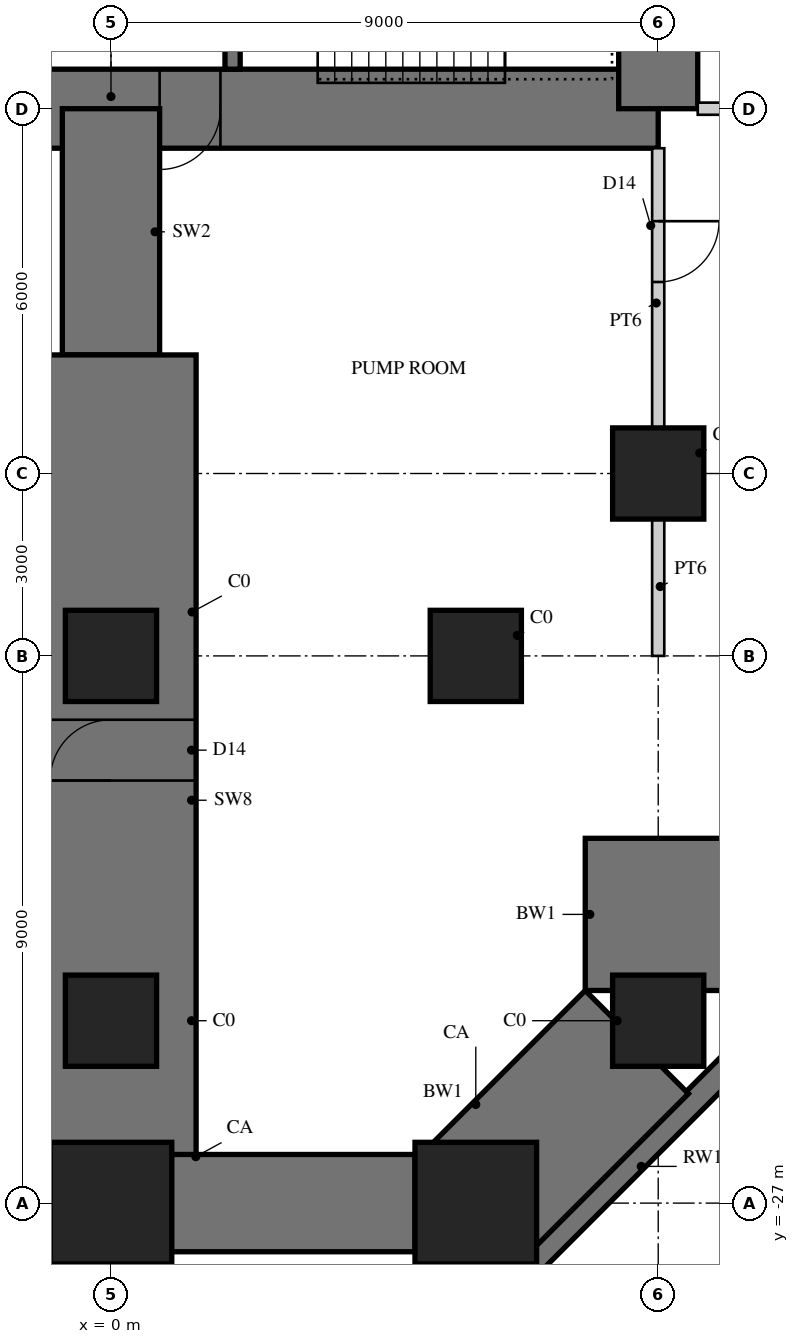
"""IFC4 building model, lengths in metres.
Left out: names, types, materials, properties, quantities, classifications, styles, units other than length and angle.
Written with IfcOpenShell. Run it as: python <this file> out.ifc"""

import sys

from ifc_helpers import new_model, si_unit, direction, frame, frame_2d, origin, origin_2d, place, context, subcontext, project, spatial, polyline, rectangle, outline, extrude, element, fill, save


model = new_model("IFC4")
c1 = context("Model", 3, precision=1e-05, world=origin(), true_north=direction((0.0, 1.0)))
c2 = subcontext(c1, "Body", "Model", "MODEL_VIEW")
j1 = project(units=[si_unit("LENGTHUNIT", "METRE"), si_unit("PLANEANGLEUNIT", "RADIAN")], contexts=[c1])
p1 = place(None, origin())
s1 = spatial("IfcSite", under=j1, at=p1, CompositionType="ELEMENT")
p2 = place(p1, origin())
s2 = spatial("IfcBuilding", under=s1, at=p2, CompositionType="ELEMENT")
p3 = place(p2, frame((0.0, 0.0, -8.0)))
s3 = spatial("IfcBuildingStorey", under=s2, at=p3, CompositionType="ELEMENT", Elevation=-8.0)
p4 = place(p3, origin())
e1 = element("IfcWall", 1, at=p4, inside=s3, PredefinedType="SOLIDWALL", context=c2, shape_type="SweptSolid", body=[
    extrude(outline(polyline([(10.15, -24.476), (10.55, -24.642), (6.642, -28.55), (6.476, -28.15), (10.15, -24.476)])), origin(), (0.0, 0.0, 1.0), 4.0),
])
p5 = place(p3, frame((-9.0, -9.0, 0.0), z_axis=(0.0, 0.0, 1.0), x_axis=(1.0, 0.0, 0.0)))
e2 = element("IfcWall", 2, at=p5, inside=s3, PredefinedType="SHEAR", context=c2, shape_type="SweptSolid", body=[
    extrude(rectangle(XDim=18.0, YDim=1.3, at=frame_2d((9.0, 0.0))), origin(), (0.0, 0.0, 1.0), 4.0),
])
p6 = place(p5, frame((9.8, 0.0, 0.0)))
e3 = element("IfcOpeningElement", 3, at=p6, cuts=e2, PredefinedType="OPENING", context=c2, shape_type="SweptSolid", body=[
    extrude(rectangle(XDim=1.0, YDim=2.4, at=frame_2d((0.5, 1.2))), frame((0.0, 0.66, 0.0), z_axis=(0.0, -1.0, 0.0), x_axis=(1.0, 0.0, 0.0)), (0.0, 0.0, 1.0), 1.32),
])
p7 = place(p3, frame((9.0, -9.0, 0.0), z_axis=(0.0, 0.0, 1.0), x_axis=(0.0, 1.0, 0.0)))
e4 = element("IfcWall", 4, at=p7, inside=s3, PredefinedType="SHEAR", context=c2, shape_type="SweptSolid", body=[
    extrude(rectangle(XDim=18.0, YDim=1.3, at=frame_2d((9.0, 0.0))), origin(), (0.0, 0.0, 1.0), 4.0),
])
p8 = place(p7, frame((9.8, 0.0, 0.0)))
e5 = element("IfcOpeningElement", 5, at=p8, cuts=e4, PredefinedType="OPENING", context=c2, shape_type="SweptSolid", body=[
    extrude(rectangle(XDim=1.0, YDim=2.4, at=frame_2d((0.5, 1.2))), frame((0.0, 0.66, 0.0), z_axis=(0.0, -1.0, 0.0), x_axis=(1.0, 0.0, 0.0)), (0.0, 0.0, 1.0), 1.32),
])
p9 = place(p3, frame((2.0, -1.675, 0.0), z_axis=(0.0, 0.0, 1.0), x_axis=(0.0, -1.0, 0.0)))
e6 = element("IfcWall", 6, at=p9, inside=s3, PredefinedType="SHEAR", context=c2, shape_type="SweptSolid", body=[
    extrude(rectangle(XDim=6.675, YDim=0.25, at=frame_2d((3.337, 0.0))), origin(), (0.0, 0.0, 1.0), 4.0),
])
p10 = place(p9, frame((0.725, 0.0, 0.0)))
e7 = element("IfcOpeningElement", 7, at=p10, cuts=e6, PredefinedType="OPENING", context=c2, shape_type="SweptSolid", body=[
    extrude(rectangle(XDim=1.0, YDim=2.1, at=frame_2d((0.5, 1.05))), frame((0.0, 0.135, 0.0), z_axis=(0.0, -1.0, 0.0), x_axis=(1.0, 0.0, 0.0)), (0.0, 0.0, 1.0), 0.27),
])
p11 = place(p3, frame((0.0, -9.0, 0.0), z_axis=(0.0, 0.0, 1.0), x_axis=(0.0, -1.0, 0.0)))
e8 = element("IfcWall", 8, at=p11, inside=s3, PredefinedType="SHEAR", context=c2, shape_type="SweptSolid", body=[
    extrude(rectangle(XDim=4.05, YDim=1.6, at=frame_2d((2.025, 0.0))), origin(), (0.0, 0.0, 1.0), 4.0),
])
p12 = place(p3, frame((0.0, -13.05, 0.0), z_axis=(0.0, 0.0, 1.0), x_axis=(0.0, -1.0, 0.0)))
e9 = element("IfcWall", 9, at=p12, inside=s3, PredefinedType="SHEAR", context=c2, shape_type="SweptSolid", body=[
    extrude(rectangle(XDim=13.95, YDim=2.8, at=frame_2d((6.975, 0.0))), origin(), (0.0, 0.0, 1.0), 4.0),
])
p13 = place(p12, frame((6.0, 0.0, 0.0)))
e10 = element("IfcOpeningElement", 10, at=p13, cuts=e9, PredefinedType="OPENING", context=c2, shape_type="SweptSolid", body=[
    extrude(rectangle(XDim=1.0, YDim=2.2, at=frame_2d((0.5, 1.1))), frame((0.0, 1.41, 0.0), z_axis=(0.0, -1.0, 0.0), x_axis=(1.0, 0.0, 0.0)), (0.0, 0.0, 1.0), 2.82),
])
p14 = place(p3, frame((9.0, -21.0, 0.0), z_axis=(0.0, 0.0, 1.0), x_axis=(0.0, -1.0, 0.0)))
e11 = element("IfcWall", 11, at=p14, inside=s3, PredefinedType="SHEAR", context=c2, shape_type="SweptSolid", body=[
    extrude(rectangle(XDim=2.503, YDim=2.4, at=frame_2d((1.251, 0.0))), origin(), (0.0, 0.0, 1.0), 4.0),
])
p15 = place(p3, frame((8.648, -24.352, 0.0), z_axis=(0.0, 0.0, 1.0), x_axis=(-0.707106781187, -0.707106781187, 0.0)))
e12 = element("IfcWall", 12, at=p15, inside=s3, PredefinedType="SHEAR", context=c2, shape_type="SweptSolid", body=[
    extrude(rectangle(XDim=3.745, YDim=2.4, at=frame_2d((1.873, 0.0))), origin(), (0.0, 0.0, 1.0), 4.0),
])
p16 = place(p3, frame((-5.0, -27.0, 0.0), z_axis=(0.0, 0.0, 1.0), x_axis=(1.0, 0.0, 0.0)))
e13 = element("IfcWall", 13, at=p16, inside=s3, PredefinedType="SHEAR", context=c2, shape_type="SweptSolid", body=[
    extrude(rectangle(XDim=10.0, YDim=1.6, at=frame_2d((5.0, 0.0))), origin(), (0.0, 0.0, 1.0), 4.0),
])
for number, where, z_axis, x_axis in (
    (14, (9.0, -15.0, 0.0), (0.0, 0.0, 1.0), (1.0, 0.0, 0.0)),
    (15, (9.0, -24.0, 0.0), (0.0, 0.0, 1.0), (1.0, 0.0, 0.0)),
):
    element("IfcColumn", number, at=place(p3, frame(where, z_axis=z_axis, x_axis=x_axis)), inside=s3, PredefinedType="COLUMN", context=c2, shape_type="SweptSolid", body=[
        extrude(rectangle(XDim=1.5, YDim=1.5, at=origin_2d()), origin(), (0.0, 0.0, 1.0), 4.0),
    ])
for number, where, z_axis, x_axis in (
    (16, (0.0, -27.0, 0.0), (0.0, 0.0, 1.0), (1.0, 0.0, 0.0)),
    (17, (6.0, -27.0, 0.0), (0.0, 0.0, 1.0), (1.0, 0.0, 0.0)),
):
    element("IfcColumn", number, at=place(p3, frame(where, z_axis=z_axis, x_axis=x_axis)), inside=s3, PredefinedType="COLUMN", context=c2, shape_type="SweptSolid", body=[
        extrude(rectangle(XDim=2.0, YDim=2.0, at=origin_2d()), origin(), (0.0, 0.0, 1.0), 4.0),
    ])
for number, where, z_axis, x_axis in (
    (18, (0.0, -18.0, 0.0), (0.0, 0.0, 1.0), (1.0, 0.0, 0.0)),
    (19, (6.0, -18.0, 0.0), (0.0, 0.0, 1.0), (1.0, 0.0, 0.0)),
    (20, (0.0, -24.0, 0.0), (0.0, 0.0, 1.0), (1.0, 0.0, 0.0)),
):
    element("IfcColumn", number, at=place(p3, frame(where, z_axis=z_axis, x_axis=x_axis)), inside=s3, PredefinedType="COLUMN", context=c2, shape_type="SweptSolid", body=[
        extrude(rectangle(XDim=1.5, YDim=1.5, at=origin_2d()), origin(), (0.0, 0.0, 1.0), 4.0),
    ])
p17 = place(p3, frame((9.0, -9.65, 0.0), z_axis=(0.0, 0.0, 1.0), x_axis=(0.0, -1.0, 0.0)))
e21 = element("IfcWall", 21, at=p17, inside=s3, PredefinedType="SOLIDWALL", context=c2, shape_type="SweptSolid", body=[
    extrude(rectangle(XDim=4.6, YDim=0.2, at=frame_2d((2.3, 0.0))), origin(), (0.0, 0.0, 1.0), 2.75),
])
p18 = place(p17, frame((1.2, 0.0, 0.0)))
e22 = element("IfcOpeningElement", 22, at=p18, cuts=e21, PredefinedType="OPENING", context=c2, shape_type="SweptSolid", body=[
    extrude(rectangle(XDim=1.0, YDim=2.2, at=frame_2d((0.5, 1.1))), frame((0.0, 0.11, 0.0), z_axis=(0.0, -1.0, 0.0), x_axis=(1.0, 0.0, 0.0)), (0.0, 0.0, 1.0), 0.22),
])
p19 = place(p3, frame((9.0, -15.75, 0.0), z_axis=(0.0, 0.0, 1.0), x_axis=(0.0, -1.0, 0.0)))
e23 = element("IfcWall", 23, at=p19, inside=s3, PredefinedType="SOLIDWALL", context=c2, shape_type="SweptSolid", body=[
    extrude(rectangle(XDim=2.25, YDim=0.2, at=frame_2d((1.125, 0.0))), origin(), (0.0, 0.0, 1.0), 2.75),
])
p20 = place(p3, frame((14.25, -9.0, 0.0), z_axis=(0.0, 0.0, 1.0), x_axis=(-1.0, 0.0, 0.0)))
e24 = element("IfcWall", 24, at=p20, inside=s3, PredefinedType="SOLIDWALL", context=c2, shape_type="SweptSolid", body=[
    extrude(rectangle(XDim=4.6, YDim=0.2, at=frame_2d((2.3, 0.0))), origin(), (0.0, 0.0, 1.0), 2.75),
])
p21 = place(p18, origin())
e25 = element("IfcDoor", 25, at=p21, inside=s3, OperationType="SINGLE_SWING_LEFT", PredefinedType="DOOR", context=c2, shape_type="SweptSolid", body=[
    extrude(rectangle(XDim=1.0, YDim=2.2, at=frame_2d((0.5, 1.1))), frame((0.0, 0.025, 0.0), z_axis=(0.0, -1.0, 0.0), x_axis=(1.0, 0.0, 0.0)), (0.0, 0.0, 1.0), 0.05),
])
fill(e22, e25)
p22 = place(p13, frame((1.0, 0.0, 0.0), z_axis=(0.0, 0.0, 1.0), x_axis=(-1.0, 0.0, 0.0)))
e26 = element("IfcDoor", 26, at=p22, inside=s3, OperationType="SINGLE_SWING_LEFT", PredefinedType="DOOR", context=c2, shape_type="SweptSolid", body=[
    extrude(rectangle(XDim=1.0, YDim=2.2, at=frame_2d((0.5, 1.1))), frame((0.0, 0.025, 0.0), z_axis=(0.0, -1.0, 0.0), x_axis=(1.0, 0.0, 0.0)), (0.0, 0.0, 1.0), 0.05),
])
fill(e10, e26)
p23 = place(p6, frame((1.0, 0.0, 0.0), z_axis=(0.0, 0.0, 1.0), x_axis=(-1.0, 0.0, 0.0)))
e27 = element("IfcDoor", 27, at=p23, inside=s3, OperationType="SINGLE_SWING_RIGHT", PredefinedType="DOOR", context=c2, shape_type="SweptSolid", body=[
    extrude(rectangle(XDim=1.0, YDim=2.4, at=frame_2d((0.5, 1.2))), frame((0.0, -0.005, 0.0), z_axis=(0.0, -1.0, 0.0), x_axis=(1.0, 0.0, 0.0)), (0.0, 0.0, 1.0), 0.05),
])
fill(e3, e27)
save(model, sys.argv[1])
